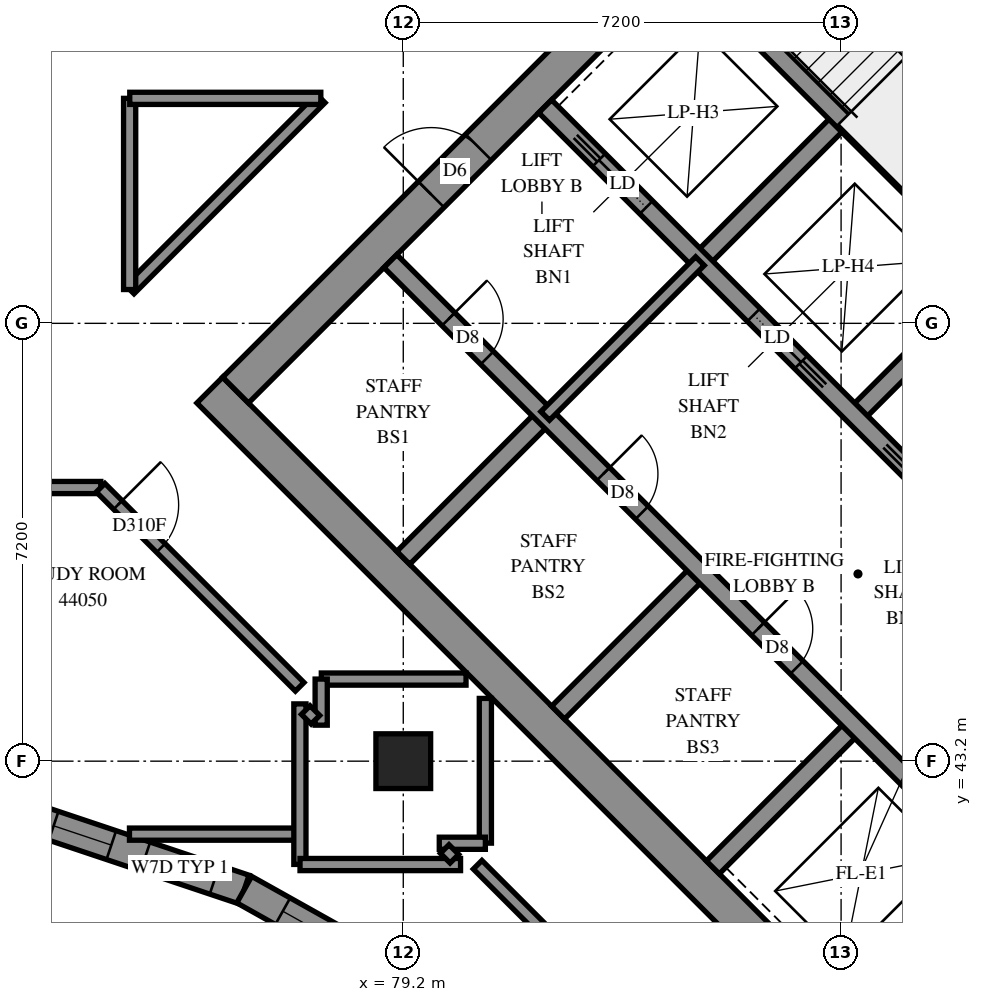
"""IFC4 building model, lengths in metres.
Left out: names, types, materials, properties, quantities, classifications, styles, units other than length and angle.
Written with IfcOpenShell. Run it as: python <this file> out.ifc"""

import sys

from ifc_helpers import new_model, si_unit, direction, frame, frame_2d, origin, origin_2d, place, context, subcontext, project, spatial, polyline, rectangle, outline, extrude, element, fill, save


model = new_model("IFC4")
c1 = context("Model", 3, precision=1e-05, world=origin(), true_north=direction((0.0, 1.0)))
c2 = subcontext(c1, "Body", "Model", "MODEL_VIEW")
j1 = project(units=[si_unit("LENGTHUNIT", "METRE"), si_unit("PLANEANGLEUNIT", "RADIAN")], contexts=[c1])
p1 = place(None, origin())
s1 = spatial("IfcSite", under=j1, at=p1, CompositionType="ELEMENT")
p2 = place(p1, origin())
s2 = spatial("IfcBuilding", under=s1, at=p2, CompositionType="ELEMENT")
p3 = place(p2, frame((0.0, 0.0, 162.6)))
s3 = spatial("IfcBuildingStorey", under=s2, at=p3, CompositionType="ELEMENT", Elevation=162.6)
p4 = place(p3, frame((79.2, 43.2, 0.0), z_axis=(0.0, 0.0, 1.0), x_axis=(1.0, 0.0, 0.0)))
e1 = element("IfcColumn", 1, at=p4, inside=s3, PredefinedType="COLUMN", context=c2, shape_type="SweptSolid", body=[
    extrude(rectangle(XDim=0.9, YDim=0.9, at=origin_2d()), origin(), (0.0, 0.0, 1.0), 3.1),
])
p5 = place(p3, frame((76.018, 49.302, -0.3), z_axis=(0.0, 0.0, 1.0), x_axis=(0.7071067812, -0.7071067812, 0.0)))
e2 = element("IfcWall", 2, at=p5, inside=s3, PredefinedType="SHEAR", context=c2, shape_type="SweptSolid", body=[
    extrude(rectangle(XDim=15.6, YDim=0.6, at=frame_2d((7.8, 0.0))), origin(), (0.0, 0.0, 1.0), 2.7),
])
p6 = place(p3, frame((86.625, 59.908, -0.3), z_axis=(0.0, 0.0, 1.0), x_axis=(0.7071067812, -0.7071067812, 0.0)))
e3 = element("IfcWall", 3, at=p6, inside=s3, PredefinedType="SHEAR", context=c2, shape_type="SweptSolid", body=[
    extrude(rectangle(XDim=15.6, YDim=0.6, at=frame_2d((7.8, 0.0))), origin(), (0.0, 0.0, 1.0), 2.7),
])
p7 = place(p6, frame((10.6, 0.0, 0.3)))
e4 = element("IfcOpeningElement", 4, at=p7, cuts=e3, PredefinedType="OPENING", context=c2, shape_type="SweptSolid", body=[
    extrude(rectangle(XDim=0.8, YDim=2.1, at=frame_2d((0.4, 1.05))), frame((0.0, 0.31, 0.0), z_axis=(0.0, -1.0, 0.0), x_axis=(1.0, 0.0, 0.0)), (0.0, 0.0, 1.0), 0.62),
])
p8 = place(p3, frame((76.442, 49.302, -0.3), z_axis=(0.0, 0.0, 1.0), x_axis=(0.7071067812, 0.7071067812, 0.0)))
e5 = element("IfcWall", 5, at=p8, inside=s3, PredefinedType="SHEAR", context=c2, shape_type="SweptSolid", body=[
    extrude(rectangle(XDim=14.4, YDim=0.6, at=frame_2d((7.2, 0.0))), origin(), (0.0, 0.0, 1.0), 2.7),
])
p9 = place(p8, frame((4.55, 0.0, 0.3)))
e6 = element("IfcOpeningElement", 6, at=p9, cuts=e5, PredefinedType="OPENING", context=c2, shape_type="SweptSolid", body=[
    extrude(rectangle(XDim=1.1, YDim=2.1, at=frame_2d((0.55, 1.05))), frame((0.0, 0.31, 0.0), z_axis=(0.0, -1.0, 0.0), x_axis=(1.0, 0.0, 0.0)), (0.0, 0.0, 1.0), 0.62),
])
p10 = place(p8, frame((11.35, 0.0, 0.3)))
e7 = element("IfcOpeningElement", 7, at=p10, cuts=e5, PredefinedType="OPENING", context=c2, shape_type="SweptSolid", body=[
    extrude(rectangle(XDim=1.1, YDim=2.1, at=frame_2d((0.55, 1.05))), frame((0.0, 0.31, 0.0), z_axis=(0.0, -1.0, 0.0), x_axis=(1.0, 0.0, 0.0)), (0.0, 0.0, 1.0), 0.62),
])
p11 = place(p3, frame((87.049, 38.695, -0.3), z_axis=(0.0, 0.0, 1.0), x_axis=(0.7071067812, 0.7071067812, 0.0)))
e8 = element("IfcWall", 8, at=p11, inside=s3, PredefinedType="SHEAR", context=c2, shape_type="SweptSolid", body=[
    extrude(rectangle(XDim=14.4, YDim=0.6, at=frame_2d((7.2, 0.0))), origin(), (0.0, 0.0, 1.0), 2.7),
])
p12 = place(p11, frame((4.55, 0.0, 0.3)))
e9 = element("IfcOpeningElement", 9, at=p12, cuts=e8, PredefinedType="OPENING", context=c2, shape_type="SweptSolid", body=[
    extrude(rectangle(XDim=1.1, YDim=2.1, at=frame_2d((0.55, 1.05))), frame((0.0, 0.31, 0.0), z_axis=(0.0, -1.0, 0.0), x_axis=(1.0, 0.0, 0.0)), (0.0, 0.0, 1.0), 0.62),
])
p13 = place(p11, frame((11.35, 0.0, 0.3)))
e10 = element("IfcOpeningElement", 10, at=p13, cuts=e8, PredefinedType="OPENING", context=c2, shape_type="SweptSolid", body=[
    extrude(rectangle(XDim=1.1, YDim=2.1, at=frame_2d((0.55, 1.05))), frame((0.0, 0.31, 0.0), z_axis=(0.0, -1.0, 0.0), x_axis=(1.0, 0.0, 0.0)), (0.0, 0.0, 1.0), 0.62),
])
for number, where, z_axis, x_axis in (
    (11, (79.2, 46.544, 0.0), (0.0, 0.0, 1.0), (0.707, 0.707, 0.0)),
    (12, (84.079, 51.423, 0.0), (0.0, 0.0, 1.0), (0.707, 0.707, 0.0)),
):
    element("IfcWall", number, at=place(p3, frame(where, z_axis=z_axis, x_axis=x_axis)), inside=s3, PredefinedType="SOLIDWALL", context=c2, shape_type="SweptSolid", body=[
        extrude(rectangle(XDim=3.3, YDim=0.3, at=frame_2d((1.65, 0.0))), origin(), (0.0, 0.0, 1.0), 3.1),
    ])
p14 = place(p3, frame((81.746, 43.999, 0.0), z_axis=(0.0, 0.0, 1.0), x_axis=(0.7071067812, 0.7071067812, 0.0)))
e13 = element("IfcWall", 13, at=p14, inside=s3, PredefinedType="SOLIDWALL", context=c2, shape_type="SweptSolid", body=[
    extrude(rectangle(XDim=3.3, YDim=0.3, at=frame_2d((1.65, 0.0))), origin(), (0.0, 0.0, 1.0), 3.1),
])
p15 = place(p3, frame((86.625, 48.878, 0.0), z_axis=(0.0, 0.0, 1.0), x_axis=(0.7071067812, 0.7071067812, 0.0)))
e14 = element("IfcWall", 14, at=p15, inside=s3, PredefinedType="SOLIDWALL", context=c2, shape_type="SweptSolid", body=[
    extrude(rectangle(XDim=3.3, YDim=0.3, at=frame_2d((1.65, 0.0))), origin(), (0.0, 0.0, 1.0), 3.1),
])
p16 = place(p3, frame((84.291, 41.453, 0.0), z_axis=(0.0, 0.0, 1.0), x_axis=(0.7071067812, 0.7071067812, 0.0)))
e15 = element("IfcWall", 15, at=p16, inside=s3, PredefinedType="SOLIDWALL", context=c2, shape_type="SweptSolid", body=[
    extrude(rectangle(XDim=3.3, YDim=0.3, at=frame_2d((1.65, 0.0))), origin(), (0.0, 0.0, 1.0), 3.1),
])
p17 = place(p3, frame((78.988, 51.423, 0.0), z_axis=(0.0, 0.0, 1.0), x_axis=(0.7071067812, -0.7071067812, 0.0)))
e16 = element("IfcWall", 16, at=p17, inside=s3, PredefinedType="SOLIDWALL", context=c2, shape_type="SweptSolid", body=[
    extrude(rectangle(XDim=14.4, YDim=0.3, at=frame_2d((7.2, 0.0))), origin(), (0.0, 0.0, 1.0), 3.1),
])
p18 = place(p17, frame((1.35, 0.0, 0.0)))
e17 = element("IfcOpeningElement", 17, at=p18, cuts=e16, PredefinedType="OPENING", context=c2, shape_type="SweptSolid", body=[
    extrude(rectangle(XDim=0.9, YDim=2.1, at=frame_2d((0.45, 1.05))), frame((0.0, 0.16, 0.0), z_axis=(0.0, -1.0, 0.0), x_axis=(1.0, 0.0, 0.0)), (0.0, 0.0, 1.0), 0.32),
])
p19 = place(p17, frame((4.95, 0.0, 0.0)))
e18 = element("IfcOpeningElement", 18, at=p19, cuts=e16, PredefinedType="OPENING", context=c2, shape_type="SweptSolid", body=[
    extrude(rectangle(XDim=0.9, YDim=2.1, at=frame_2d((0.45, 1.05))), frame((0.0, 0.16, 0.0), z_axis=(0.0, -1.0, 0.0), x_axis=(1.0, 0.0, 0.0)), (0.0, 0.0, 1.0), 0.32),
])
p20 = place(p17, frame((8.55, 0.0, 0.0)))
e19 = element("IfcOpeningElement", 19, at=p20, cuts=e16, PredefinedType="OPENING", context=c2, shape_type="SweptSolid", body=[
    extrude(rectangle(XDim=0.9, YDim=2.1, at=frame_2d((0.45, 1.05))), frame((0.0, 0.16, 0.0), z_axis=(0.0, -1.0, 0.0), x_axis=(1.0, 0.0, 0.0)), (0.0, 0.0, 1.0), 0.32),
])
p21 = place(p17, frame((12.05, 0.0, 0.0)))
e20 = element("IfcOpeningElement", 20, at=p21, cuts=e16, PredefinedType="OPENING", context=c2, shape_type="SweptSolid", body=[
    extrude(rectangle(XDim=1.1, YDim=2.1, at=frame_2d((0.55, 1.05))), frame((0.0, 0.16, 0.0), z_axis=(0.0, -1.0, 0.0), x_axis=(1.0, 0.0, 0.0)), (0.0, 0.0, 1.0), 0.32),
])
p22 = place(p3, frame((81.534, 53.969, 0.0), z_axis=(0.0, 0.0, 1.0), x_axis=(0.707103309, -0.7071102534, 0.0)))
e21 = element("IfcWall", 21, at=p22, inside=s3, PredefinedType="SOLIDWALL", context=c2, shape_type="SweptSolid", body=[
    extrude(rectangle(XDim=14.4, YDim=0.3, at=frame_2d((7.2, 0.0))), origin(), (0.0, 0.0, 1.0), 3.1),
])
p23 = place(p22, frame((1.25, 0.0, 0.0)))
e22 = element("IfcOpeningElement", 22, at=p23, cuts=e21, PredefinedType="OPENING", context=c2, shape_type="SweptSolid", body=[
    extrude(rectangle(XDim=1.1, YDim=2.1, at=frame_2d((0.55, 1.05))), frame((0.0, 0.16, 0.0), z_axis=(0.0, -1.0, 0.0), x_axis=(1.0, 0.0, 0.0)), (0.0, 0.0, 1.0), 0.32),
])
p24 = place(p22, frame((4.85, 0.0, 0.0)))
e23 = element("IfcOpeningElement", 23, at=p24, cuts=e21, PredefinedType="OPENING", context=c2, shape_type="SweptSolid", body=[
    extrude(rectangle(XDim=1.1, YDim=2.1, at=frame_2d((0.55, 1.05))), frame((0.0, 0.16, 0.0), z_axis=(0.0, -1.0, 0.0), x_axis=(1.0, 0.0, 0.0)), (0.0, 0.0, 1.0), 0.32),
])
p25 = place(p22, frame((8.45, 0.0, 0.0)))
e24 = element("IfcOpeningElement", 24, at=p25, cuts=e21, PredefinedType="OPENING", context=c2, shape_type="SweptSolid", body=[
    extrude(rectangle(XDim=1.1, YDim=2.1, at=frame_2d((0.55, 1.05))), frame((0.0, 0.16, 0.0), z_axis=(0.0, -1.0, 0.0), x_axis=(1.0, 0.0, 0.0)), (0.0, 0.0, 1.0), 0.32),
])
p26 = place(p22, frame((12.05, 0.0, 0.0)))
e25 = element("IfcOpeningElement", 25, at=p26, cuts=e21, PredefinedType="OPENING", context=c2, shape_type="SweptSolid", body=[
    extrude(rectangle(XDim=1.1, YDim=2.1, at=frame_2d((0.55, 1.05))), frame((0.0, 0.16, 0.0), z_axis=(0.0, -1.0, 0.0), x_axis=(1.0, 0.0, 0.0)), (0.0, 0.0, 1.0), 0.32),
])
p27 = place(p3, frame((83.867, 56.302, 0.0), z_axis=(0.0, 0.0, 1.0), x_axis=(0.7071137256, -0.7070998367, 0.0)))
e26 = element("IfcWall", 26, at=p27, inside=s3, PredefinedType="SOLIDWALL", context=c2, shape_type="SweptSolid", body=[
    extrude(rectangle(XDim=7.2, YDim=0.3, at=frame_2d((3.6, 0.0))), origin(), (0.0, 0.0, 1.0), 3.1),
])
p28 = place(p3, frame((73.094, 42.257, 0.0), z_axis=(0.0, 0.0, 1.0), x_axis=(0.9482477624, -0.3175313861, 0.0)))
e27 = element("IfcWall", 27, at=p28, inside=s3, PredefinedType="SOLIDWALL", context=c2, shape_type="SweptSolid", body=[
    extrude(outline(polyline([(0.061, -0.25), (3.658, -0.25), (3.705, 0.25), (-0.061, 0.25), (0.061, -0.25)])), origin(), (0.0, 0.0, 1.0), 3.1),
])
p29 = place(p28, frame((0.376, 0.0, 0.45)))
e28 = element("IfcOpeningElement", 28, at=p29, cuts=e27, PredefinedType="OPENING", context=c2, shape_type="SweptSolid", body=[
    extrude(rectangle(XDim=1.0, YDim=2.5, at=frame_2d((0.5, 1.25))), frame((0.0, 0.26, 0.0), z_axis=(0.0, -1.0, 0.0), x_axis=(1.0, 0.0, 0.0)), (0.0, 0.0, 1.0), 0.52),
])
p30 = place(p28, frame((1.967, 0.0, 0.5)))
e29 = element("IfcOpeningElement", 29, at=p30, cuts=e27, PredefinedType="OPENING", context=c2, shape_type="SweptSolid", body=[
    extrude(rectangle(XDim=1.2, YDim=2.45, at=frame_2d((0.6, 1.225))), frame((0.0, 0.26, 0.0), z_axis=(0.0, -1.0, 0.0), x_axis=(1.0, 0.0, 0.0)), (0.0, 0.0, 1.0), 0.52),
])
p31 = place(p3, frame((76.585, 41.088, 0.0), z_axis=(0.0, 0.0, 1.0), x_axis=(0.8724681922, -0.4886709053, 0.0)))
e30 = element("IfcWall", 30, at=p31, inside=s3, PredefinedType="SOLIDWALL", context=c2, shape_type="SweptSolid", body=[
    extrude(outline(polyline([(0.024, -0.25), (4.231, -0.25), (4.335, 0.25), (-0.024, 0.25), (0.024, -0.25)])), origin(), (0.0, 0.0, 1.0), 3.1),
])
p32 = place(p31, frame((0.727, 0.0, 0.45)))
e31 = element("IfcOpeningElement", 31, at=p32, cuts=e30, PredefinedType="OPENING", context=c2, shape_type="SweptSolid", body=[
    extrude(rectangle(XDim=1.2, YDim=2.5, at=frame_2d((0.6, 1.25))), frame((0.0, 0.26, 0.0), z_axis=(0.0, -1.0, 0.0), x_axis=(1.0, 0.0, 0.0)), (0.0, 0.0, 1.0), 0.52),
])
p33 = place(p31, frame((2.268, 0.0, 0.45)))
e32 = element("IfcOpeningElement", 32, at=p33, cuts=e30, PredefinedType="OPENING", context=c2, shape_type="SweptSolid", body=[
    extrude(rectangle(XDim=1.2, YDim=2.5, at=frame_2d((0.6, 1.25))), frame((0.0, 0.26, 0.0), z_axis=(0.0, -1.0, 0.0), x_axis=(1.0, 0.0, 0.0)), (0.0, 0.0, 1.0), 0.52),
])
p34 = place(p3, frame((81.534, 48.878, 0.0), z_axis=(0.0, 0.0, 1.0), x_axis=(0.707092892, 0.7071206701, 0.0)))
e33 = element("IfcWall", 33, at=p34, inside=s3, PredefinedType="PARTITIONING", context=c2, shape_type="SweptSolid", body=[
    extrude(rectangle(XDim=3.6, YDim=0.2, at=frame_2d((1.8, 0.0))), origin(), (0.0, 0.0, 1.0), 3.1),
])
p35 = place(p3, frame((54.9, 47.7, 0.0), z_axis=(0.0, 0.0, 1.0), x_axis=(1.0, 0.0, 0.0)))
e34 = element("IfcWall", 34, at=p35, inside=s3, PredefinedType="PARTITIONING", context=c2, shape_type="SweptSolid", body=[
    extrude(rectangle(XDim=19.326, YDim=0.2, at=frame_2d((9.663, 0.0))), origin(), (0.0, 0.0, 1.0), 3.1),
])
p36 = place(p35, frame((6.599, 0.0, 0.0)))
e35 = element("IfcOpeningElement", 35, at=p36, cuts=e34, PredefinedType="OPENING", context=c2, shape_type="SweptSolid", body=[
    extrude(rectangle(XDim=0.9, YDim=2.1, at=frame_2d((0.45, 1.05))), frame((0.0, 0.11, 0.0), z_axis=(0.0, -1.0, 0.0), x_axis=(1.0, 0.0, 0.0)), (0.0, 0.0, 1.0), 0.22),
])
p37 = place(p35, frame((13.799, 0.0, 0.0)))
e36 = element("IfcOpeningElement", 36, at=p37, cuts=e34, PredefinedType="OPENING", context=c2, shape_type="SweptSolid", body=[
    extrude(rectangle(XDim=0.9, YDim=2.1, at=frame_2d((0.45, 1.05))), frame((0.0, 0.11, 0.0), z_axis=(0.0, -1.0, 0.0), x_axis=(1.0, 0.0, 0.0)), (0.0, 0.0, 1.0), 0.22),
])
p38 = place(p3, frame((86.841, 63.093, 0.0), z_axis=(0.0, 0.0, 1.0), x_axis=(0.7071067812, -0.7071067812, 0.0)))
e37 = element("IfcWall", 37, at=p38, inside=s3, PredefinedType="PARTITIONING", context=c2, shape_type="SweptSolid", body=[
    extrude(rectangle(XDim=12.239, YDim=0.2, at=frame_2d((6.119, 0.0))), origin(), (0.0, 0.0, 1.0), 3.1),
])
p39 = place(p3, frame((80.423, 41.497, 0.0), z_axis=(0.0, 0.0, 1.0), x_axis=(0.7071067812, -0.7071067812, 0.0)))
e38 = element("IfcWall", 38, at=p39, inside=s3, PredefinedType="PARTITIONING", context=c2, shape_type="SweptSolid", body=[
    extrude(rectangle(XDim=9.065, YDim=0.2, at=frame_2d((4.532, 0.0))), origin(), (0.0, 0.0, 1.0), 3.1),
])
p40 = place(p3, frame((74.223, 47.697, 0.0), z_axis=(0.0, 0.0, 1.0), x_axis=(0.7071067812, -0.7071067812, 0.0)))
e39 = element("IfcWall", 39, at=p40, inside=s3, PredefinedType="PARTITIONING", context=c2, shape_type="SweptSolid", body=[
    extrude(rectangle(XDim=4.63, YDim=0.2, at=frame_2d((2.315, 0.0))), origin(), (0.0, 0.0, 1.0), 3.1),
])
p41 = place(p40, frame((0.401, 0.0, 0.0)))
e40 = element("IfcOpeningElement", 40, at=p41, cuts=e39, PredefinedType="OPENING", context=c2, shape_type="SweptSolid", body=[
    extrude(rectangle(XDim=1.0, YDim=2.1, at=frame_2d((0.5, 1.05))), frame((0.0, 0.11, 0.0), z_axis=(0.0, -1.0, 0.0), x_axis=(1.0, 0.0, 0.0)), (0.0, 0.0, 1.0), 0.22),
])
p42 = place(p3, frame((74.701, 50.957, 0.0), z_axis=(0.0, 0.0, 1.0), x_axis=(0.7071067812, 0.7071067812, 0.0)))
e41 = element("IfcWall", 41, at=p42, inside=s3, PredefinedType="PARTITIONING", context=c2, shape_type="SweptSolid", body=[
    extrude(rectangle(XDim=4.444, YDim=0.2, at=frame_2d((2.222, 0.0))), origin(), (0.0, 0.0, 1.0), 3.1),
])
p43 = place(p3, frame((74.7, 50.956, 0.0), z_axis=(0.0, 0.0, 1.0), x_axis=(0.0, 1.0, 0.0)))
e42 = element("IfcWall", 42, at=p43, inside=s3, PredefinedType="PARTITIONING", context=c2, shape_type="SweptSolid", body=[
    extrude(rectangle(XDim=3.144, YDim=0.2, at=frame_2d((1.572, 0.0))), origin(), (0.0, 0.0, 1.0), 3.1),
])
p44 = place(p3, frame((74.702, 54.1, 0.0), z_axis=(0.0, 0.0, 1.0), x_axis=(1.0, 0.0, 0.0)))
e43 = element("IfcWall", 43, at=p44, inside=s3, PredefinedType="PARTITIONING", context=c2, shape_type="SweptSolid", body=[
    extrude(rectangle(XDim=3.142, YDim=0.2, at=frame_2d((1.571, 0.0))), origin(), (0.0, 0.0, 1.0), 3.1),
])
p45 = place(p3, frame((74.697, 42.0, 0.0), z_axis=(0.0, 0.0, 1.0), x_axis=(1.0, 0.0, 0.0)))
e44 = element("IfcWall", 44, at=p45, inside=s3, PredefinedType="PARTITIONING", context=c2, shape_type="SweptSolid", body=[
    extrude(rectangle(XDim=2.803, YDim=0.2, at=frame_2d((1.401, 0.0))), origin(), (0.0, 0.0, 1.0), 3.1),
])
for number, where, z_axis, x_axis in (
    (45, (77.5, 41.502, 0.0), (0.0, 0.0, 1.0), (0.0, 1.0, 0.0)),
    (46, (77.502, 41.5, 0.0), (0.0, 0.0, 1.0), (1.0, 0.0, 0.0)),
):
    element("IfcWall", number, at=place(p3, frame(where, z_axis=z_axis, x_axis=x_axis)), inside=s3, PredefinedType="PARTITIONING", context=c2, shape_type="SweptSolid", body=[
        extrude(rectangle(XDim=2.64, YDim=0.2, at=frame_2d((1.32, 0.0))), origin(), (0.0, 0.0, 1.0), 3.1),
    ])
for number, where, z_axis, x_axis in (
    (47, (80.55, 41.852, 0.0), (0.0, 0.0, 1.0), (0.0, 1.0, 0.0)),
    (48, (77.852, 44.55, 0.0), (0.0, 0.0, 1.0), (1.0, 0.0, 0.0)),
):
    element("IfcWall", number, at=place(p3, frame(where, z_axis=z_axis, x_axis=x_axis)), inside=s3, PredefinedType="PARTITIONING", context=c2, shape_type="SweptSolid", body=[
        extrude(rectangle(XDim=2.38, YDim=0.2, at=frame_2d((1.19, 0.0))), origin(), (0.0, 0.0, 1.0), 3.1),
    ])
for number, where, z_axis, x_axis in (
    (49, (77.85, 43.792, 0.0), (0.0, 0.0, 1.0), (0.0, 1.0, 0.0)),
    (50, (79.792, 41.85, 0.0), (0.0, 0.0, 1.0), (1.0, 0.0, 0.0)),
):
    element("IfcWall", number, at=place(p3, frame(where, z_axis=z_axis, x_axis=x_axis)), inside=s3, PredefinedType="PARTITIONING", context=c2, shape_type="SweptSolid", body=[
        extrude(rectangle(XDim=0.758, YDim=0.2, at=frame_2d((0.379, 0.0))), origin(), (0.0, 0.0, 1.0), 3.1),
    ])
for number, where, z_axis, x_axis in (
    (51, (79.881, 41.755, 0.0), (0.0, 0.0, 1.0), (0.707, -0.707, 0.0)),
    (52, (77.596, 44.04, 0.0), (0.0, 0.0, 1.0), (0.707, -0.707, 0.0)),
):
    element("IfcWall", number, at=place(p3, frame(where, z_axis=z_axis, x_axis=x_axis)), inside=s3, PredefinedType="PARTITIONING", context=c2, shape_type="SweptSolid", body=[
        extrude(rectangle(XDim=0.225, YDim=0.2, at=frame_2d((0.113, 0.0))), origin(), (0.0, 0.0, 1.0), 3.1),
    ])
p46 = place(p32, origin())
e53 = element("IfcWindow", 53, at=p46, inside=s3, PartitioningType="SINGLE_PANEL", PredefinedType="WINDOW", context=c2, shape_type="SweptSolid", body=[
    extrude(rectangle(XDim=1.2, YDim=2.5, at=frame_2d((0.6, 1.25))), frame((0.0, 0.18, 0.0), z_axis=(0.0, -1.0, 0.0), x_axis=(1.0, 0.0, 0.0)), (0.0, 0.0, 1.0), 0.06),
])
fill(e31, e53)
p47 = place(p9, origin())
e54 = element("IfcDoor", 54, at=p47, inside=s3, OperationType="DOUBLE_DOOR_SINGLE_SWING", PredefinedType="DOOR", context=c2, shape_type="SweptSolid", body=[
    extrude(rectangle(XDim=1.1, YDim=2.1, at=frame_2d((0.55, 1.05))), frame((0.0, 0.025, 0.0), z_axis=(0.0, -1.0, 0.0), x_axis=(1.0, 0.0, 0.0)), (0.0, 0.0, 1.0), 0.05),
])
fill(e6, e54)
p48 = place(p18, origin())
e55 = element("IfcDoor", 55, at=p48, inside=s3, OperationType="SINGLE_SWING_LEFT", PredefinedType="DOOR", context=c2, shape_type="SweptSolid", body=[
    extrude(rectangle(XDim=0.9, YDim=2.1, at=frame_2d((0.45, 1.05))), frame((0.0, 0.025, 0.0), z_axis=(0.0, -1.0, 0.0), x_axis=(1.0, 0.0, 0.0)), (0.0, 0.0, 1.0), 0.05),
])
fill(e17, e55)
p49 = place(p19, origin())
e56 = element("IfcDoor", 56, at=p49, inside=s3, OperationType="SINGLE_SWING_LEFT", PredefinedType="DOOR", context=c2, shape_type="SweptSolid", body=[
    extrude(rectangle(XDim=0.9, YDim=2.1, at=frame_2d((0.45, 1.05))), frame((0.0, 0.025, 0.0), z_axis=(0.0, -1.0, 0.0), x_axis=(1.0, 0.0, 0.0)), (0.0, 0.0, 1.0), 0.05),
])
fill(e18, e56)
p50 = place(p20, origin())
e57 = element("IfcDoor", 57, at=p50, inside=s3, OperationType="SINGLE_SWING_LEFT", PredefinedType="DOOR", context=c2, shape_type="SweptSolid", body=[
    extrude(rectangle(XDim=0.9, YDim=2.1, at=frame_2d((0.45, 1.05))), frame((0.0, 0.025, 0.0), z_axis=(0.0, -1.0, 0.0), x_axis=(1.0, 0.0, 0.0)), (0.0, 0.0, 1.0), 0.05),
])
fill(e19, e57)
p51 = place(p23, origin())
e58 = element("IfcDoor", 58, at=p51, inside=s3, OperationType="SLIDING_TO_LEFT", PredefinedType="DOOR", context=c2, shape_type="SweptSolid", body=[
    extrude(rectangle(XDim=1.1, YDim=2.1, at=frame_2d((0.55, 1.05))), frame((0.0, 0.025, 0.0), z_axis=(0.0, -1.0, 0.0), x_axis=(1.0, 0.0, 0.0)), (0.0, 0.0, 1.0), 0.05),
])
fill(e22, e58)
p52 = place(p24, origin())
e59 = element("IfcDoor", 59, at=p52, inside=s3, OperationType="SLIDING_TO_RIGHT", PredefinedType="DOOR", context=c2, shape_type="SweptSolid", body=[
    extrude(rectangle(XDim=1.1, YDim=2.1, at=frame_2d((0.55, 1.05))), frame((0.0, 0.025, 0.0), z_axis=(0.0, -1.0, 0.0), x_axis=(1.0, 0.0, 0.0)), (0.0, 0.0, 1.0), 0.05),
])
fill(e23, e59)
p53 = place(p41, origin())
e60 = element("IfcDoor", 60, at=p53, inside=s3, OperationType="SINGLE_SWING_LEFT", PredefinedType="DOOR", context=c2, shape_type="SweptSolid", body=[
    extrude(rectangle(XDim=1.0, YDim=2.1, at=frame_2d((0.5, 1.05))), frame((0.0, 0.025, 0.0), z_axis=(0.0, -1.0, 0.0), x_axis=(1.0, 0.0, 0.0)), (0.0, 0.0, 1.0), 0.05),
])
fill(e40, e60)
p54 = place(p29, origin())
e61 = element("IfcWindow", 61, at=p54, inside=s3, PartitioningType="SINGLE_PANEL", PredefinedType="WINDOW", context=c2, shape_type="SweptSolid", body=[
    extrude(rectangle(XDim=1.0, YDim=2.5, at=frame_2d((0.5, 1.25))), frame((0.0, 0.18, 0.0), z_axis=(0.0, -1.0, 0.0), x_axis=(1.0, 0.0, 0.0)), (0.0, 0.0, 1.0), 0.06),
])
fill(e28, e61)
p55 = place(p30, origin())
e62 = element("IfcWindow", 62, at=p55, inside=s3, PartitioningType="SINGLE_PANEL", PredefinedType="WINDOW", context=c2, shape_type="SweptSolid", body=[
    extrude(rectangle(XDim=1.2, YDim=2.45, at=frame_2d((0.6, 1.225))), frame((0.0, 0.18, 0.0), z_axis=(0.0, -1.0, 0.0), x_axis=(1.0, 0.0, 0.0)), (0.0, 0.0, 1.0), 0.06),
])
fill(e29, e62)
save(model, sys.argv[1])
